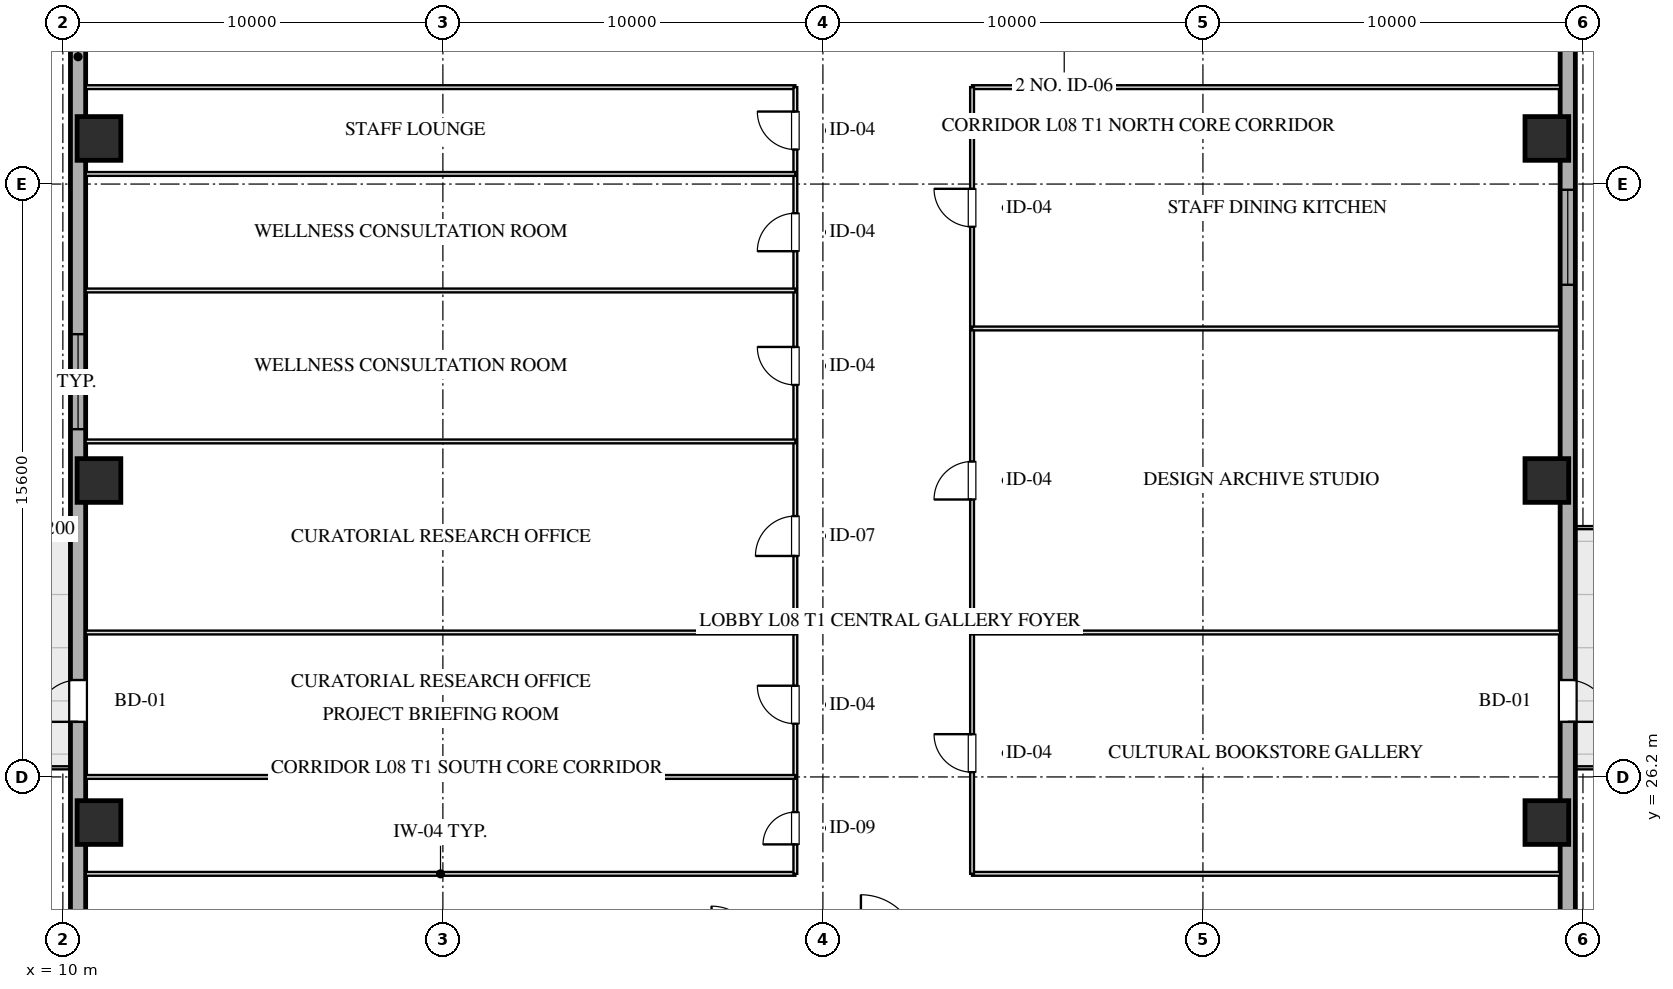
"""IFC4 building model, lengths in metres.
Left out: names, types, materials, properties, quantities, classifications, styles, units other than length and angle.
Written with IfcOpenShell. Run it as: python <this file> out.ifc"""

import sys

from ifc_helpers import new_model, si_unit, direction, frame, frame_2d, origin, origin_2d, place, context, subcontext, project, spatial, rectangle, hollow_rectangle, extrude, element, fill, save


model = new_model("IFC4")
c1 = context("Model", 3, precision=1e-05, world=origin(), true_north=direction((0.0, 1.0)))
c2 = subcontext(c1, "Body", "Model", "MODEL_VIEW")
j1 = project(units=[si_unit("LENGTHUNIT", "METRE"), si_unit("PLANEANGLEUNIT", "RADIAN")], contexts=[c1])
p1 = place(None, origin())
s1 = spatial("IfcSite", under=j1, at=p1, CompositionType="ELEMENT")
p2 = place(p1, origin())
s2 = spatial("IfcBuilding", under=s1, at=p2, CompositionType="ELEMENT")
p3 = place(p2, frame((0.0, 0.0, 38.0)))
s3 = spatial("IfcBuildingStorey", under=s2, at=p3, CompositionType="ELEMENT", Elevation=38.0)
for number, where, z_axis, x_axis in (
    (1, (10.95, 25.0, 0.0), (0.0, 0.0, 1.0), (1.0, 0.0, 0.0)),
    (2, (10.95, 34.0, 0.0), (0.0, 0.0, 1.0), (1.0, 0.0, 0.0)),
    (3, (10.95, 43.0, 0.0), (0.0, 0.0, 1.0), (1.0, 0.0, 0.0)),
    (4, (49.05, 25.0, 0.0), (0.0, 0.0, 1.0), (1.0, 0.0, 0.0)),
    (5, (49.05, 34.0, 0.0), (0.0, 0.0, 1.0), (1.0, 0.0, 0.0)),
    (6, (49.05, 43.0, 0.0), (0.0, 0.0, 1.0), (1.0, 0.0, 0.0)),
):
    element("IfcColumn", number, at=place(p3, frame(where, z_axis=z_axis, x_axis=x_axis)), inside=s3, PredefinedType="COLUMN", context=c2, shape_type="SweptSolid", body=[
        extrude(hollow_rectangle(XDim=1.15, YDim=1.15, WallThickness=0.04, at=origin_2d()), origin(), (0.0, 0.0, 1.0), 4.001),
    ])
p4 = place(p3, frame((10.4, 7.2, 0.0), z_axis=(0.0, 0.0, 1.0), x_axis=(0.0, 1.0, 0.0)))
e7 = element("IfcWall", 7, at=p4, inside=s3, PredefinedType="SOLIDWALL", context=c2, shape_type="SweptSolid", body=[
    extrude(rectangle(XDim=53.6, YDim=0.4, at=frame_2d((26.8, 0.0))), origin(), (0.0, 0.0, 1.0), 3.16),
])
p5 = place(p4, frame((28.15, 0.0, 0.75)))
e8 = element("IfcOpeningElement", 8, at=p5, cuts=e7, PredefinedType="OPENING", context=c2, shape_type="SweptSolid", body=[
    extrude(rectangle(XDim=2.5, YDim=1.75, at=frame_2d((1.25, 0.875))), frame((0.0, 0.21, 0.0), z_axis=(0.0, -1.0, 0.0), x_axis=(1.0, 0.0, 0.0)), (0.0, 0.0, 1.0), 0.42),
])
p6 = place(p4, frame((20.45, 0.0, 0.0)))
e9 = element("IfcOpeningElement", 9, at=p6, cuts=e7, PredefinedType="OPENING", context=c2, shape_type="SweptSolid", body=[
    extrude(rectangle(XDim=1.1, YDim=2.15, at=frame_2d((0.55, 1.075))), frame((0.0, 0.21, 0.0), z_axis=(0.0, -1.0, 0.0), x_axis=(1.0, 0.0, 0.0)), (0.0, 0.0, 1.0), 0.42),
])
p7 = place(p3, frame((49.6, 60.8, 0.0), z_axis=(0.0, 0.0, 1.0), x_axis=(0.0, -1.0, 0.0)))
e10 = element("IfcWall", 10, at=p7, inside=s3, PredefinedType="SOLIDWALL", context=c2, shape_type="SweptSolid", body=[
    extrude(rectangle(XDim=53.6, YDim=0.4, at=frame_2d((26.8, 0.0))), origin(), (0.0, 0.0, 1.0), 3.16),
])
p8 = place(p7, frame((19.15, 0.0, 0.75)))
e11 = element("IfcOpeningElement", 11, at=p8, cuts=e10, PredefinedType="OPENING", context=c2, shape_type="SweptSolid", body=[
    extrude(rectangle(XDim=2.5, YDim=1.75, at=frame_2d((1.25, 0.875))), frame((0.0, 0.21, 0.0), z_axis=(0.0, -1.0, 0.0), x_axis=(1.0, 0.0, 0.0)), (0.0, 0.0, 1.0), 0.42),
])
p9 = place(p7, frame((32.05, 0.0, 0.0)))
e12 = element("IfcOpeningElement", 12, at=p9, cuts=e10, PredefinedType="OPENING", context=c2, shape_type="SweptSolid", body=[
    extrude(rectangle(XDim=1.1, YDim=2.15, at=frame_2d((0.55, 1.075))), frame((0.0, 0.21, 0.0), z_axis=(0.0, -1.0, 0.0), x_axis=(1.0, 0.0, 0.0)), (0.0, 0.0, 1.0), 0.42),
])
p10 = place(p3, frame((10.6, 23.65, 0.0), z_axis=(0.0, 0.0, 1.0), x_axis=(1.0, 0.0, 0.0)))
e13 = element("IfcWall", 13, at=p10, inside=s3, PredefinedType="MOVABLE", context=c2, shape_type="SweptSolid", body=[
    extrude(rectangle(XDim=18.675, YDim=0.1, at=frame_2d((9.337, 0.0))), origin(), (0.0, 0.0, 1.0), 3.725),
])
p11 = place(p3, frame((33.925, 23.65, 0.0), z_axis=(0.0, 0.0, 1.0), x_axis=(1.0, 0.0, 0.0)))
e14 = element("IfcWall", 14, at=p11, inside=s3, PredefinedType="MOVABLE", context=c2, shape_type="SweptSolid", body=[
    extrude(rectangle(XDim=15.475, YDim=0.1, at=frame_2d((7.737, 0.0))), origin(), (0.0, 0.0, 1.0), 3.725),
])
p12 = place(p3, frame((10.6, 44.35, 0.0), z_axis=(0.0, 0.0, 1.0), x_axis=(1.0, 0.0, 0.0)))
e15 = element("IfcWall", 15, at=p12, inside=s3, PredefinedType="MOVABLE", context=c2, shape_type="SweptSolid", body=[
    extrude(rectangle(XDim=18.675, YDim=0.1, at=frame_2d((9.337, 0.0))), origin(), (0.0, 0.0, 1.0), 3.725),
])
p13 = place(p3, frame((33.925, 44.35, 0.0), z_axis=(0.0, 0.0, 1.0), x_axis=(1.0, 0.0, 0.0)))
e16 = element("IfcWall", 16, at=p13, inside=s3, PredefinedType="MOVABLE", context=c2, shape_type="SweptSolid", body=[
    extrude(rectangle(XDim=15.475, YDim=0.1, at=frame_2d((7.737, 0.0))), origin(), (0.0, 0.0, 1.0), 3.725),
])
p14 = place(p3, frame((29.275, 23.65, 0.0), z_axis=(0.0, 0.0, 1.0), x_axis=(0.0, 1.0, 0.0)))
e17 = element("IfcWall", 17, at=p14, inside=s3, PredefinedType="MOVABLE", context=c2, shape_type="SweptSolid", body=[
    extrude(rectangle(XDim=20.7, YDim=0.1, at=frame_2d((10.35, 0.0))), origin(), (0.0, 0.0, 1.0), 3.725),
])
p15 = place(p14, frame((0.775, 0.0, 0.0)))
e18 = element("IfcOpeningElement", 18, at=p15, cuts=e17, PredefinedType="OPENING", context=c2, shape_type="SweptSolid", body=[
    extrude(rectangle(XDim=0.85, YDim=2.05, at=frame_2d((0.425, 1.025))), frame((0.0, 0.06, 0.0), z_axis=(0.0, -1.0, 0.0), x_axis=(1.0, 0.0, 0.0)), (0.0, 0.0, 1.0), 0.12),
])
p16 = place(p14, frame((3.95, 0.0, 0.0)))
e19 = element("IfcOpeningElement", 19, at=p16, cuts=e17, PredefinedType="OPENING", context=c2, shape_type="SweptSolid", body=[
    extrude(rectangle(XDim=1.0, YDim=2.05, at=frame_2d((0.5, 1.025))), frame((0.0, 0.06, 0.0), z_axis=(0.0, -1.0, 0.0), x_axis=(1.0, 0.0, 0.0)), (0.0, 0.0, 1.0), 0.12),
])
p17 = place(p14, frame((8.364, 0.0, 0.0)))
e20 = element("IfcOpeningElement", 20, at=p17, cuts=e17, PredefinedType="OPENING", context=c2, shape_type="SweptSolid", body=[
    extrude(rectangle(XDim=1.05, YDim=2.05, at=frame_2d((0.525, 1.025))), frame((0.0, 0.06, 0.0), z_axis=(0.0, -1.0, 0.0), x_axis=(1.0, 0.0, 0.0)), (0.0, 0.0, 1.0), 0.12),
])
p18 = place(p14, frame((12.864, 0.0, 0.0)))
e21 = element("IfcOpeningElement", 21, at=p18, cuts=e17, PredefinedType="OPENING", context=c2, shape_type="SweptSolid", body=[
    extrude(rectangle(XDim=1.0, YDim=2.05, at=frame_2d((0.5, 1.025))), frame((0.0, 0.06, 0.0), z_axis=(0.0, -1.0, 0.0), x_axis=(1.0, 0.0, 0.0)), (0.0, 0.0, 1.0), 0.12),
])
p19 = place(p14, frame((16.383, 0.0, 0.0)))
e22 = element("IfcOpeningElement", 22, at=p19, cuts=e17, PredefinedType="OPENING", context=c2, shape_type="SweptSolid", body=[
    extrude(rectangle(XDim=1.0, YDim=2.05, at=frame_2d((0.5, 1.025))), frame((0.0, 0.06, 0.0), z_axis=(0.0, -1.0, 0.0), x_axis=(1.0, 0.0, 0.0)), (0.0, 0.0, 1.0), 0.12),
])
p20 = place(p14, frame((19.058, 0.0, 0.0)))
e23 = element("IfcOpeningElement", 23, at=p20, cuts=e17, PredefinedType="OPENING", context=c2, shape_type="SweptSolid", body=[
    extrude(rectangle(XDim=1.0, YDim=2.05, at=frame_2d((0.5, 1.025))), frame((0.0, 0.06, 0.0), z_axis=(0.0, -1.0, 0.0), x_axis=(1.0, 0.0, 0.0)), (0.0, 0.0, 1.0), 0.12),
])
p21 = place(p3, frame((33.925, 23.65, 0.0), z_axis=(0.0, 0.0, 1.0), x_axis=(0.0, 1.0, 0.0)))
e24 = element("IfcWall", 24, at=p21, inside=s3, PredefinedType="MOVABLE", context=c2, shape_type="SweptSolid", body=[
    extrude(rectangle(XDim=20.7, YDim=0.1, at=frame_2d((10.35, 0.0))), origin(), (0.0, 0.0, 1.0), 3.725),
])
p22 = place(p21, frame((2.675, 0.0, 0.0)))
e25 = element("IfcOpeningElement", 25, at=p22, cuts=e24, PredefinedType="OPENING", context=c2, shape_type="SweptSolid", body=[
    extrude(rectangle(XDim=1.0, YDim=2.05, at=frame_2d((0.5, 1.025))), frame((0.0, 0.06, 0.0), z_axis=(0.0, -1.0, 0.0), x_axis=(1.0, 0.0, 0.0)), (0.0, 0.0, 1.0), 0.12),
])
p23 = place(p21, frame((9.85, 0.0, 0.0)))
e26 = element("IfcOpeningElement", 26, at=p23, cuts=e24, PredefinedType="OPENING", context=c2, shape_type="SweptSolid", body=[
    extrude(rectangle(XDim=1.0, YDim=2.05, at=frame_2d((0.5, 1.025))), frame((0.0, 0.06, 0.0), z_axis=(0.0, -1.0, 0.0), x_axis=(1.0, 0.0, 0.0)), (0.0, 0.0, 1.0), 0.12),
])
p24 = place(p21, frame((17.025, 0.0, 0.0)))
e27 = element("IfcOpeningElement", 27, at=p24, cuts=e24, PredefinedType="OPENING", context=c2, shape_type="SweptSolid", body=[
    extrude(rectangle(XDim=1.0, YDim=2.05, at=frame_2d((0.5, 1.025))), frame((0.0, 0.06, 0.0), z_axis=(0.0, -1.0, 0.0), x_axis=(1.0, 0.0, 0.0)), (0.0, 0.0, 1.0), 0.12),
])
for number, where, z_axis, x_axis in (
    (28, (10.6, 26.2, 0.0), (0.0, 0.0, 1.0), (1.0, 0.0, 0.0)),
    (29, (10.6, 30.0, 0.0), (0.0, 0.0, 1.0), (1.0, 0.0, 0.0)),
    (30, (10.6, 35.028, 0.0), (0.0, 0.0, 1.0), (1.0, 0.0, 0.0)),
    (31, (10.6, 39.0, 0.0), (0.0, 0.0, 1.0), (1.0, 0.0, 0.0)),
    (32, (10.6, 42.066, 0.0), (0.0, 0.0, 1.0), (1.0, 0.0, 0.0)),
):
    element("IfcWall", number, at=place(p3, frame(where, z_axis=z_axis, x_axis=x_axis)), inside=s3, PredefinedType="MOVABLE", context=c2, shape_type="SweptSolid", body=[
        extrude(rectangle(XDim=18.675, YDim=0.1, at=frame_2d((9.337, 0.0))), origin(), (0.0, 0.0, 1.0), 3.725),
    ])
for number, where, z_axis, x_axis in (
    (33, (33.925, 30.0, 0.0), (0.0, 0.0, 1.0), (1.0, 0.0, 0.0)),
    (34, (33.925, 38.0, 0.0), (0.0, 0.0, 1.0), (1.0, 0.0, 0.0)),
):
    element("IfcWall", number, at=place(p3, frame(where, z_axis=z_axis, x_axis=x_axis)), inside=s3, PredefinedType="MOVABLE", context=c2, shape_type="SweptSolid", body=[
        extrude(rectangle(XDim=15.475, YDim=0.1, at=frame_2d((7.737, 0.0))), origin(), (0.0, 0.0, 1.0), 3.725),
    ])
p25 = place(p5, origin())
e35 = element("IfcWindow", 35, at=p25, inside=s3, PartitioningType="TRIPLE_PANEL_VERTICAL", PredefinedType="WINDOW", context=c2, shape_type="SweptSolid", body=[
    extrude(rectangle(XDim=2.5, YDim=1.75, at=frame_2d((1.25, 0.875))), frame((0.0, 0.03, 0.0), z_axis=(0.0, -1.0, 0.0), x_axis=(1.0, 0.0, 0.0)), (0.0, 0.0, 1.0), 0.06),
])
fill(e8, e35)
p26 = place(p8, origin())
e36 = element("IfcWindow", 36, at=p26, inside=s3, PartitioningType="TRIPLE_PANEL_VERTICAL", PredefinedType="WINDOW", context=c2, shape_type="SweptSolid", body=[
    extrude(rectangle(XDim=2.5, YDim=1.75, at=frame_2d((1.25, 0.875))), frame((0.0, 0.03, 0.0), z_axis=(0.0, -1.0, 0.0), x_axis=(1.0, 0.0, 0.0)), (0.0, 0.0, 1.0), 0.06),
])
fill(e11, e36)
p27 = place(p6, origin())
e37 = element("IfcDoor", 37, at=p27, inside=s3, OperationType="SINGLE_SWING_LEFT", PredefinedType="DOOR", context=c2, shape_type="SweptSolid", body=[
    extrude(rectangle(XDim=1.1, YDim=2.15, at=frame_2d((0.55, 1.075))), frame((0.0, 0.025, 0.0), z_axis=(0.0, -1.0, 0.0), x_axis=(1.0, 0.0, 0.0)), (0.0, 0.0, 1.0), 0.05),
])
fill(e9, e37)
p28 = place(p9, origin())
e38 = element("IfcDoor", 38, at=p28, inside=s3, OperationType="SINGLE_SWING_RIGHT", PredefinedType="DOOR", context=c2, shape_type="SweptSolid", body=[
    extrude(rectangle(XDim=1.1, YDim=2.15, at=frame_2d((0.55, 1.075))), frame((0.0, 0.025, 0.0), z_axis=(0.0, -1.0, 0.0), x_axis=(1.0, 0.0, 0.0)), (0.0, 0.0, 1.0), 0.05),
])
fill(e12, e38)
p29 = place(p15, origin())
e39 = element("IfcDoor", 39, at=p29, inside=s3, OperationType="SINGLE_SWING_LEFT", PredefinedType="DOOR", context=c2, shape_type="SweptSolid", body=[
    extrude(rectangle(XDim=0.85, YDim=2.05, at=frame_2d((0.425, 1.025))), frame((0.0, 0.025, 0.0), z_axis=(0.0, -1.0, 0.0), x_axis=(1.0, 0.0, 0.0)), (0.0, 0.0, 1.0), 0.05),
])
fill(e18, e39)
p30 = place(p16, origin())
e40 = element("IfcDoor", 40, at=p30, inside=s3, OperationType="SINGLE_SWING_RIGHT", PredefinedType="DOOR", context=c2, shape_type="SweptSolid", body=[
    extrude(rectangle(XDim=1.0, YDim=2.05, at=frame_2d((0.5, 1.025))), frame((0.0, 0.025, 0.0), z_axis=(0.0, -1.0, 0.0), x_axis=(1.0, 0.0, 0.0)), (0.0, 0.0, 1.0), 0.05),
])
fill(e19, e40)
p31 = place(p17, origin())
e41 = element("IfcDoor", 41, at=p31, inside=s3, OperationType="SINGLE_SWING_LEFT", PredefinedType="DOOR", context=c2, shape_type="SweptSolid", body=[
    extrude(rectangle(XDim=1.05, YDim=2.05, at=frame_2d((0.525, 1.025))), frame((0.0, 0.025, 0.0), z_axis=(0.0, -1.0, 0.0), x_axis=(1.0, 0.0, 0.0)), (0.0, 0.0, 1.0), 0.05),
])
fill(e20, e41)
p32 = place(p18, origin())
e42 = element("IfcDoor", 42, at=p32, inside=s3, OperationType="SINGLE_SWING_RIGHT", PredefinedType="DOOR", context=c2, shape_type="SweptSolid", body=[
    extrude(rectangle(XDim=1.0, YDim=2.05, at=frame_2d((0.5, 1.025))), frame((0.0, 0.025, 0.0), z_axis=(0.0, -1.0, 0.0), x_axis=(1.0, 0.0, 0.0)), (0.0, 0.0, 1.0), 0.05),
])
fill(e21, e42)
p33 = place(p19, origin())
e43 = element("IfcDoor", 43, at=p33, inside=s3, OperationType="SINGLE_SWING_LEFT", PredefinedType="DOOR", context=c2, shape_type="SweptSolid", body=[
    extrude(rectangle(XDim=1.0, YDim=2.05, at=frame_2d((0.5, 1.025))), frame((0.0, 0.025, 0.0), z_axis=(0.0, -1.0, 0.0), x_axis=(1.0, 0.0, 0.0)), (0.0, 0.0, 1.0), 0.05),
])
fill(e22, e43)
p34 = place(p20, origin())
e44 = element("IfcDoor", 44, at=p34, inside=s3, OperationType="SINGLE_SWING_RIGHT", PredefinedType="DOOR", context=c2, shape_type="SweptSolid", body=[
    extrude(rectangle(XDim=1.0, YDim=2.05, at=frame_2d((0.5, 1.025))), frame((0.0, 0.025, 0.0), z_axis=(0.0, -1.0, 0.0), x_axis=(1.0, 0.0, 0.0)), (0.0, 0.0, 1.0), 0.05),
])
fill(e23, e44)
p35 = place(p22, origin())
e45 = element("IfcDoor", 45, at=p35, inside=s3, OperationType="SINGLE_SWING_RIGHT", PredefinedType="DOOR", context=c2, shape_type="SweptSolid", body=[
    extrude(rectangle(XDim=1.0, YDim=2.05, at=frame_2d((0.5, 1.025))), frame((0.0, 0.025, 0.0), z_axis=(0.0, -1.0, 0.0), x_axis=(1.0, 0.0, 0.0)), (0.0, 0.0, 1.0), 0.05),
])
fill(e25, e45)
p36 = place(p23, origin())
e46 = element("IfcDoor", 46, at=p36, inside=s3, OperationType="SINGLE_SWING_LEFT", PredefinedType="DOOR", context=c2, shape_type="SweptSolid", body=[
    extrude(rectangle(XDim=1.0, YDim=2.05, at=frame_2d((0.5, 1.025))), frame((0.0, 0.025, 0.0), z_axis=(0.0, -1.0, 0.0), x_axis=(1.0, 0.0, 0.0)), (0.0, 0.0, 1.0), 0.05),
])
fill(e26, e46)
p37 = place(p24, origin())
e47 = element("IfcDoor", 47, at=p37, inside=s3, OperationType="SINGLE_SWING_RIGHT", PredefinedType="DOOR", context=c2, shape_type="SweptSolid", body=[
    extrude(rectangle(XDim=1.0, YDim=2.05, at=frame_2d((0.5, 1.025))), frame((0.0, 0.025, 0.0), z_axis=(0.0, -1.0, 0.0), x_axis=(1.0, 0.0, 0.0)), (0.0, 0.0, 1.0), 0.05),
])
fill(e27, e47)
save(model, sys.argv[1])
